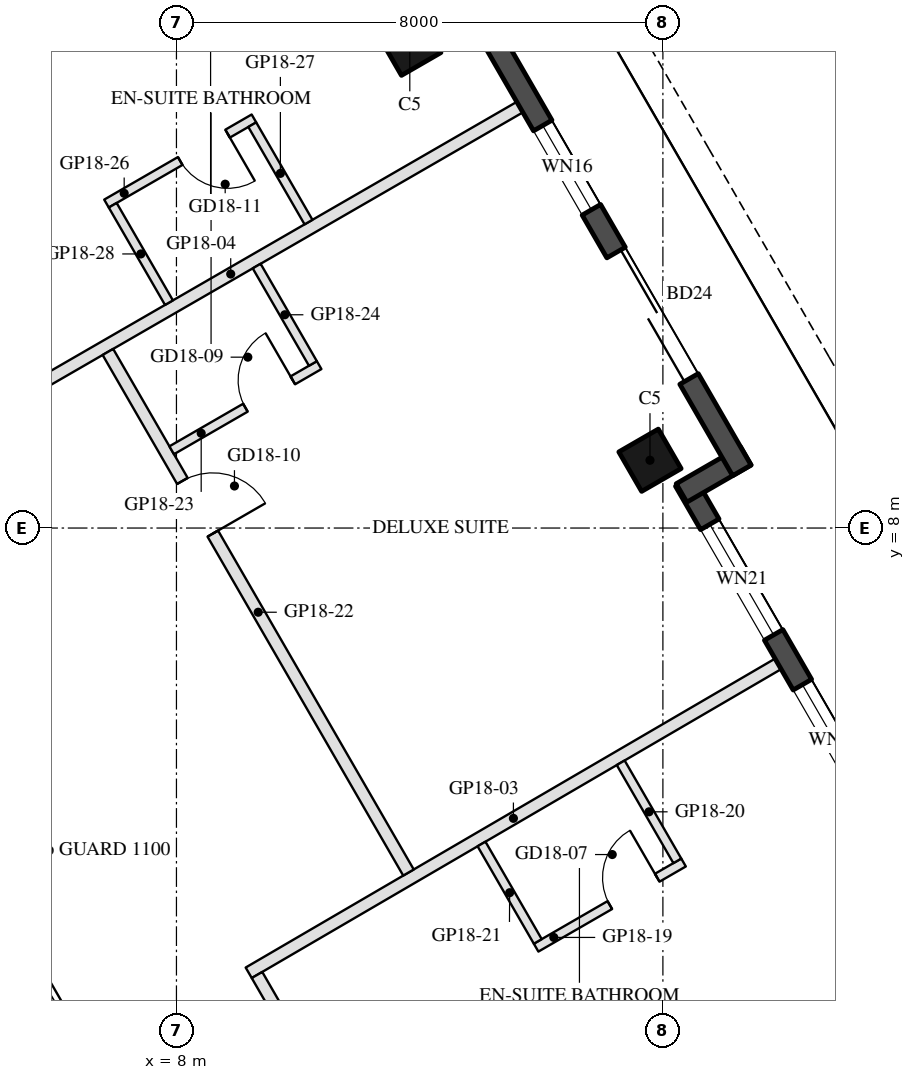
"""IFC4 building model, lengths in metres.
Left out: names, types, materials, properties, quantities, classifications, styles, units other than length and angle.
Written with IfcOpenShell. Run it as: python <this file> out.ifc"""

import sys

from ifc_helpers import new_model, si_unit, direction, frame, frame_2d, origin, origin_2d, place, context, subcontext, project, spatial, rectangle, hollow_rectangle, extrude, element, fill, save


model = new_model("IFC4")
c1 = context("Model", 3, precision=1e-05, world=origin(), true_north=direction((0.0, 1.0)))
c2 = subcontext(c1, "Body", "Model", "MODEL_VIEW")
j1 = project(units=[si_unit("LENGTHUNIT", "METRE"), si_unit("PLANEANGLEUNIT", "RADIAN")], contexts=[c1])
p1 = place(None, origin())
s1 = spatial("IfcSite", under=j1, at=p1, CompositionType="ELEMENT")
p2 = place(p1, origin())
s2 = spatial("IfcBuilding", under=s1, at=p2, CompositionType="ELEMENT")
p3 = place(p2, frame((0.0, 0.0, 194.7)))
s3 = spatial("IfcBuildingStorey", under=s2, at=p3, CompositionType="ELEMENT", Elevation=194.7)
for number, where, z_axis, x_axis in (
    (1, (15.788, 9.115, 0.0), (0.0, 0.0, 1.0), (-0.5, 0.866, 0.0)),
    (2, (11.838, 15.957, 0.0), (0.0, 0.0, 1.0), (-0.5, 0.866, 0.0)),
):
    element("IfcColumn", number, at=place(p3, frame(where, z_axis=z_axis, x_axis=x_axis)), inside=s3, PredefinedType="COLUMN", context=c2, shape_type="SweptSolid", body=[
        extrude(hollow_rectangle(XDim=0.75, YDim=0.75, WallThickness=0.035, at=origin_2d()), origin(), (0.0, 0.0, 1.0), 3.7),
    ])
p4 = place(p3, frame((19.729, 2.938, 0.0), z_axis=(0.0, 0.0, 1.0), x_axis=(-0.499976430342, 0.866039011305, 0.0)))
e3 = element("IfcWall", 3, at=p4, inside=s3, PredefinedType="SOLIDWALL", context=c2, shape_type="SweptSolid", body=[
    extrude(rectangle(XDim=6.74, YDim=0.35, at=frame_2d((3.37, 0.0))), origin(), (0.0, 0.0, 1.0), 3.55),
])
p5 = place(p4, frame((0.77, 0.0, 0.3)))
e4 = element("IfcOpeningElement", 4, at=p5, cuts=e3, PredefinedType="OPENING", context=c2, shape_type="SweptSolid", body=[
    extrude(rectangle(XDim=2.1, YDim=2.65, at=frame_2d((1.05, 1.325))), frame((0.0, 0.185, 0.0), z_axis=(0.0, -1.0, 0.0), x_axis=(1.0, 0.0, 0.0)), (0.0, 0.0, 1.0), 0.37),
])
p6 = place(p4, frame((3.815, 0.0, 0.3)))
e5 = element("IfcOpeningElement", 5, at=p6, cuts=e3, PredefinedType="OPENING", context=c2, shape_type="SweptSolid", body=[
    extrude(rectangle(XDim=2.1, YDim=2.65, at=frame_2d((1.05, 1.325))), frame((0.0, 0.185, 0.0), z_axis=(0.0, -1.0, 0.0), x_axis=(1.0, 0.0, 0.0)), (0.0, 0.0, 1.0), 0.37),
])
p7 = place(p3, frame((16.306, 8.577, 0.0), z_axis=(0.0, 0.0, 1.0), x_axis=(0.866092288191, 0.499884134912, 0.0)))
e6 = element("IfcWall", 6, at=p7, inside=s3, PredefinedType="SOLIDWALL", context=c2, shape_type="SweptSolid", body=[
    extrude(rectangle(XDim=1.22, YDim=0.35, at=frame_2d((0.61, 0.0))), origin(), (0.0, 0.0, 1.0), 3.55),
])
p8 = place(p3, frame((17.299, 8.948, 0.0), z_axis=(0.0, 0.0, 1.0), x_axis=(-0.500010041276, 0.866019606374, 0.0)))
e7 = element("IfcWall", 7, at=p8, inside=s3, PredefinedType="SOLIDWALL", context=c2, shape_type="SweptSolid", body=[
    extrude(rectangle(XDim=9.7, YDim=0.35, at=frame_2d((4.85, 0.0))), origin(), (0.0, 0.0, 1.0), 3.55),
])
p9 = place(p8, frame((1.737, 0.0, 0.0)))
e8 = element("IfcOpeningElement", 8, at=p9, cuts=e7, PredefinedType="OPENING", context=c2, shape_type="SweptSolid", body=[
    extrude(rectangle(XDim=2.4, YDim=2.4, at=frame_2d((1.2, 1.2))), frame((0.0, 0.185, 0.0), z_axis=(0.0, -1.0, 0.0), x_axis=(1.0, 0.0, 0.0)), (0.0, 0.0, 1.0), 0.37),
])
p10 = place(p8, frame((4.949, 0.0, 0.3)))
e9 = element("IfcOpeningElement", 9, at=p10, cuts=e7, PredefinedType="OPENING", context=c2, shape_type="SweptSolid", body=[
    extrude(rectangle(XDim=1.6, YDim=2.65, at=frame_2d((0.8, 1.325))), frame((0.0, 0.185, 0.0), z_axis=(0.0, -1.0, 0.0), x_axis=(1.0, 0.0, 0.0)), (0.0, 0.0, 1.0), 0.37),
])
p11 = place(p3, frame((17.895, 5.766, 0.0), z_axis=(0.0, 0.0, 1.0), x_axis=(-0.863697195261, -0.504011066246, 0.0)))
e10 = element("IfcWall", 10, at=p11, inside=s3, PredefinedType="PARTITIONING", context=c2, shape_type="SweptSolid", body=[
    extrude(rectangle(XDim=10.08, YDim=0.2, at=frame_2d((5.04, 0.0))), origin(), (0.0, 0.0, 1.0), 2.95),
])
p12 = place(p3, frame((13.647, 14.923, 0.0), z_axis=(0.0, 0.0, 1.0), x_axis=(-0.866027479907, -0.499996404033, 0.0)))
e11 = element("IfcWall", 11, at=p12, inside=s3, PredefinedType="PARTITIONING", context=c2, shape_type="SweptSolid", body=[
    extrude(rectangle(XDim=10.98, YDim=0.2, at=frame_2d((5.49, 0.0))), origin(), (0.0, 0.0, 1.0), 3.06),
])
p13 = place(p3, frame((9.325, 0.649, 0.0), z_axis=(0.0, 0.0, 1.0), x_axis=(0.500032331163, -0.866006736574, 0.0)))
e12 = element("IfcWall", 12, at=p13, inside=s3, PredefinedType="PARTITIONING", context=c2, shape_type="SweptSolid", body=[
    extrude(rectangle(XDim=5.888, YDim=0.2, at=frame_2d((2.944, 0.0))), origin(), (0.0, 0.0, 1.0), 2.95),
])
p14 = place(p13, frame((2.444, 0.0, 0.0)))
e13 = element("IfcOpeningElement", 13, at=p14, cuts=e12, PredefinedType="OPENING", context=c2, shape_type="SweptSolid", body=[
    extrude(rectangle(XDim=1.0, YDim=2.1, at=frame_2d((0.5, 1.05))), frame((0.0, 0.11, 0.0), z_axis=(0.0, -1.0, 0.0), x_axis=(1.0, 0.0, 0.0)), (0.0, 0.0, 1.0), 0.22),
])
p15 = place(p3, frame((13.915, 1.099, 0.0), z_axis=(0.0, 0.0, 1.0), x_axis=(0.866018616679, 0.500011755427, 0.0)))
e14 = element("IfcWall", 14, at=p15, inside=s3, PredefinedType="PARTITIONING", context=c2, shape_type="SweptSolid", body=[
    extrude(rectangle(XDim=2.8, YDim=0.15, at=frame_2d((1.4, 0.0))), origin(), (0.0, 0.0, 1.0), 3.55),
])
p16 = place(p15, frame((1.4, 0.0, 0.0)))
e15 = element("IfcOpeningElement", 15, at=p16, cuts=e14, PredefinedType="OPENING", context=c2, shape_type="SweptSolid", body=[
    extrude(rectangle(XDim=0.9, YDim=2.1, at=frame_2d((0.45, 1.05))), frame((0.0, 0.085, 0.0), z_axis=(0.0, -1.0, 0.0), x_axis=(1.0, 0.0, 0.0)), (0.0, 0.0, 1.0), 0.17),
])
p17 = place(p3, frame((16.237, 2.526, 0.0), z_axis=(0.0, 0.0, 1.0), x_axis=(-0.500043919151, 0.866000045566, 0.0)))
e16 = element("IfcWall", 16, at=p17, inside=s3, PredefinedType="PARTITIONING", context=c2, shape_type="SweptSolid", body=[
    extrude(rectangle(XDim=1.863, YDim=0.15, at=frame_2d((0.931, 0.0))), origin(), (0.0, 0.0, 1.0), 3.55),
])
p18 = place(p3, frame((13.942, 1.201, 0.0), z_axis=(0.0, 0.0, 1.0), x_axis=(-0.500026996568, 0.866009816748, 0.0)))
e17 = element("IfcWall", 17, at=p18, inside=s3, PredefinedType="PARTITIONING", context=c2, shape_type="SweptSolid", body=[
    extrude(rectangle(XDim=1.851, YDim=0.15, at=frame_2d((0.925, 0.0))), origin(), (0.0, 0.0, 1.0), 3.55),
])
p19 = place(p3, frame((6.873, 10.896, 0.0), z_axis=(0.0, 0.0, 1.0), x_axis=(0.499987518031, -0.866032610133, 0.0)))
e18 = element("IfcWall", 18, at=p19, inside=s3, PredefinedType="PARTITIONING", context=c2, shape_type="SweptSolid", body=[
    extrude(rectangle(XDim=9.886, YDim=0.2, at=frame_2d((4.943, 0.0))), origin(), (0.0, 0.0, 1.0), 2.95),
])
p20 = place(p19, frame((2.45, 0.0, 0.0)))
e19 = element("IfcOpeningElement", 19, at=p20, cuts=e18, PredefinedType="OPENING", context=c2, shape_type="SweptSolid", body=[
    extrude(rectangle(XDim=1.0, YDim=2.1, at=frame_2d((0.5, 1.05))), frame((0.0, 0.11, 0.0), z_axis=(0.0, -1.0, 0.0), x_axis=(1.0, 0.0, 0.0)), (0.0, 0.0, 1.0), 0.22),
])
p21 = place(p3, frame((7.922, 9.279, 0.0), z_axis=(0.0, 0.0, 1.0), x_axis=(0.865996816683, 0.500049511043, 0.0)))
e20 = element("IfcWall", 20, at=p21, inside=s3, PredefinedType="PARTITIONING", context=c2, shape_type="SweptSolid", body=[
    extrude(rectangle(XDim=2.8, YDim=0.15, at=frame_2d((1.4, 0.0))), origin(), (0.0, 0.0, 1.0), 2.95),
])
p22 = place(p21, frame((1.4, 0.0, 0.0)))
e21 = element("IfcOpeningElement", 21, at=p22, cuts=e20, PredefinedType="OPENING", context=c2, shape_type="SweptSolid", body=[
    extrude(rectangle(XDim=0.9, YDim=2.1, at=frame_2d((0.45, 1.05))), frame((0.0, 0.085, 0.0), z_axis=(0.0, -1.0, 0.0), x_axis=(1.0, 0.0, 0.0)), (0.0, 0.0, 1.0), 0.17),
])
p23 = place(p3, frame((10.244, 10.707, 0.0), z_axis=(0.0, 0.0, 1.0), x_axis=(-0.500042316284, 0.866000971088, 0.0)))
e22 = element("IfcWall", 22, at=p23, inside=s3, PredefinedType="PARTITIONING", context=c2, shape_type="SweptSolid", body=[
    extrude(rectangle(XDim=1.85, YDim=0.15, at=frame_2d((0.925, 0.0))), origin(), (0.0, 0.0, 1.0), 3.55),
])
p24 = place(p3, frame((9.274, 14.737, 0.0), z_axis=(0.0, 0.0, 1.0), x_axis=(-0.866018616679, -0.500011755427, 0.0)))
e23 = element("IfcWall", 23, at=p24, inside=s3, PredefinedType="PARTITIONING", context=c2, shape_type="SweptSolid", body=[
    extrude(rectangle(XDim=2.8, YDim=0.15, at=frame_2d((1.4, 0.0))), origin(), (0.0, 0.0, 1.0), 3.55),
])
p25 = place(p24, frame((0.5, 0.0, 0.0)))
e24 = element("IfcOpeningElement", 24, at=p25, cuts=e23, PredefinedType="OPENING", context=c2, shape_type="SweptSolid", body=[
    extrude(rectangle(XDim=0.9, YDim=2.1, at=frame_2d((0.45, 1.05))), frame((0.0, 0.085, 0.0), z_axis=(0.0, -1.0, 0.0), x_axis=(1.0, 0.0, 0.0)), (0.0, 0.0, 1.0), 0.17),
])
p26 = place(p3, frame((10.172, 13.032, 0.0), z_axis=(0.0, 0.0, 1.0), x_axis=(-0.500042316284, 0.866000971088, 0.0)))
e25 = element("IfcWall", 25, at=p26, inside=s3, PredefinedType="PARTITIONING", context=c2, shape_type="SweptSolid", body=[
    extrude(rectangle(XDim=1.85, YDim=0.15, at=frame_2d((0.925, 0.0))), origin(), (0.0, 0.0, 1.0), 2.95),
])
p27 = place(p3, frame((7.877, 11.707, 0.0), z_axis=(0.0, 0.0, 1.0), x_axis=(-0.499985172903, 0.866033964044, 0.0)))
e26 = element("IfcWall", 26, at=p27, inside=s3, PredefinedType="PARTITIONING", context=c2, shape_type="SweptSolid", body=[
    extrude(rectangle(XDim=1.85, YDim=0.15, at=frame_2d((0.925, 0.0))), origin(), (0.0, 0.0, 1.0), 2.95),
])
p28 = place(p5, origin())
e27 = element("IfcWindow", 27, at=p28, inside=s3, PartitioningType="SINGLE_PANEL", PredefinedType="WINDOW", context=c2, shape_type="SweptSolid", body=[
    extrude(rectangle(XDim=2.1, YDim=2.65, at=frame_2d((1.05, 1.325))), frame((0.0, 0.03, 0.0), z_axis=(0.0, -1.0, 0.0), x_axis=(1.0, 0.0, 0.0)), (0.0, 0.0, 1.0), 0.06),
])
fill(e4, e27)
p29 = place(p6, origin())
e28 = element("IfcWindow", 28, at=p29, inside=s3, PartitioningType="SINGLE_PANEL", PredefinedType="WINDOW", context=c2, shape_type="SweptSolid", body=[
    extrude(rectangle(XDim=2.1, YDim=2.65, at=frame_2d((1.05, 1.325))), frame((0.0, 0.03, 0.0), z_axis=(0.0, -1.0, 0.0), x_axis=(1.0, 0.0, 0.0)), (0.0, 0.0, 1.0), 0.06),
])
fill(e5, e28)
p30 = place(p9, frame((2.4, 0.0, 0.0), z_axis=(0.0, 0.0, 1.0), x_axis=(-1.0, 0.0, 0.0)))
e29 = element("IfcDoor", 29, at=p30, inside=s3, OperationType="SLIDING_TO_LEFT", PredefinedType="DOOR", context=c2, shape_type="SweptSolid", body=[
    extrude(rectangle(XDim=2.4, YDim=2.4, at=frame_2d((1.2, 1.2))), frame((0.0, 0.025, 0.0), z_axis=(0.0, -1.0, 0.0), x_axis=(1.0, 0.0, 0.0)), (0.0, 0.0, 1.0), 0.05),
])
fill(e8, e29)
p31 = place(p10, origin())
e30 = element("IfcWindow", 30, at=p31, inside=s3, PartitioningType="SINGLE_PANEL", PredefinedType="WINDOW", context=c2, shape_type="SweptSolid", body=[
    extrude(rectangle(XDim=1.6, YDim=2.65, at=frame_2d((0.8, 1.325))), frame((0.0, 0.03, 0.0), z_axis=(0.0, -1.0, 0.0), x_axis=(1.0, 0.0, 0.0)), (0.0, 0.0, 1.0), 0.06),
])
fill(e9, e30)
p32 = place(p16, origin())
e31 = element("IfcDoor", 31, at=p32, inside=s3, OperationType="SINGLE_SWING_RIGHT", PredefinedType="DOOR", context=c2, shape_type="SweptSolid", body=[
    extrude(rectangle(XDim=0.9, YDim=2.1, at=frame_2d((0.45, 1.05))), frame((0.0, 0.025, 0.0), z_axis=(0.0, -1.0, 0.0), x_axis=(1.0, 0.0, 0.0)), (0.0, 0.0, 1.0), 0.05),
])
fill(e15, e31)
p33 = place(p22, origin())
e32 = element("IfcDoor", 32, at=p33, inside=s3, OperationType="SINGLE_SWING_RIGHT", PredefinedType="DOOR", context=c2, shape_type="SweptSolid", body=[
    extrude(rectangle(XDim=0.9, YDim=2.1, at=frame_2d((0.45, 1.05))), frame((0.0, 0.025, 0.0), z_axis=(0.0, -1.0, 0.0), x_axis=(1.0, 0.0, 0.0)), (0.0, 0.0, 1.0), 0.05),
])
fill(e21, e32)
p34 = place(p20, origin())
e33 = element("IfcDoor", 33, at=p34, inside=s3, OperationType="SINGLE_SWING_RIGHT", PredefinedType="DOOR", context=c2, shape_type="SweptSolid", body=[
    extrude(rectangle(XDim=1.0, YDim=2.1, at=frame_2d((0.5, 1.05))), frame((0.0, 0.025, 0.0), z_axis=(0.0, -1.0, 0.0), x_axis=(1.0, 0.0, 0.0)), (0.0, 0.0, 1.0), 0.05),
])
fill(e19, e33)
p35 = place(p25, origin())
e34 = element("IfcDoor", 34, at=p35, inside=s3, OperationType="SINGLE_SWING_LEFT", PredefinedType="DOOR", context=c2, shape_type="SweptSolid", body=[
    extrude(rectangle(XDim=0.9, YDim=2.1, at=frame_2d((0.45, 1.05))), frame((0.0, 0.025, 0.0), z_axis=(0.0, -1.0, 0.0), x_axis=(1.0, 0.0, 0.0)), (0.0, 0.0, 1.0), 0.05),
])
fill(e24, e34)
save(model, sys.argv[1])
